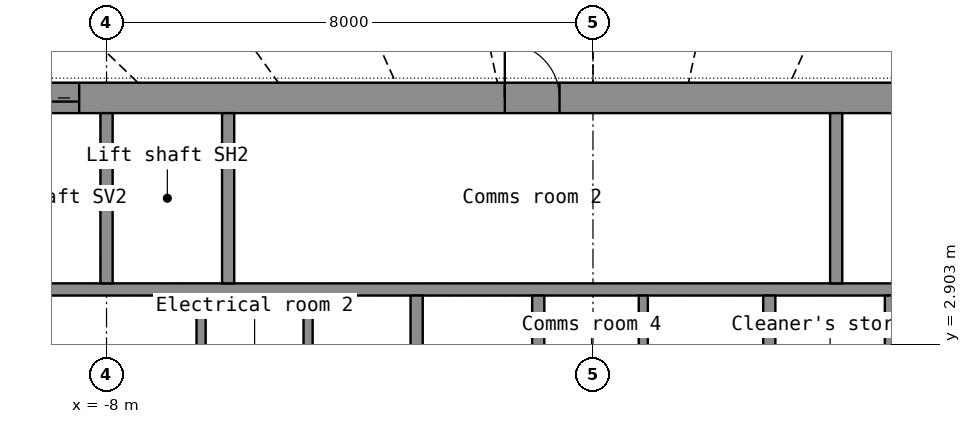
"""IFC4 building model, lengths in metres.
Left out: names, types, materials, properties, quantities, classifications, styles, units other than length and angle.
Written with IfcOpenShell. Run it as: python <this file> out.ifc"""

import sys

from ifc_helpers import new_model, si_unit, direction, frame, frame_2d, origin, place, context, subcontext, project, spatial, rectangle, extrude, element, fill, save


model = new_model("IFC4")
c1 = context("Model", 3, precision=1e-05, world=origin(), true_north=direction((0.0, 1.0)))
c2 = subcontext(c1, "Body", "Model", "MODEL_VIEW")
j1 = project(units=[si_unit("LENGTHUNIT", "METRE"), si_unit("PLANEANGLEUNIT", "RADIAN")], contexts=[c1])
p1 = place(None, origin())
s1 = spatial("IfcSite", under=j1, at=p1, CompositionType="ELEMENT")
p2 = place(p1, origin())
s2 = spatial("IfcBuilding", under=s1, at=p2, CompositionType="ELEMENT")
p3 = place(p2, frame((0.0, 0.0, 130.4)))
s3 = spatial("IfcBuildingStorey", under=s2, at=p3, CompositionType="ELEMENT", Elevation=130.4)
p4 = place(p3, frame((-11.5, 6.95, 0.0), z_axis=(0.0, 0.0, 1.0), x_axis=(1.0, 0.0, 0.0)))
e1 = element("IfcWall", 1, at=p4, inside=s3, PredefinedType="SHEAR", context=c2, shape_type="SweptSolid", body=[
    extrude(rectangle(XDim=23.0, YDim=0.5, at=frame_2d((11.5, 0.0))), origin(), (0.0, 0.0, 1.0), 3.3),
])
p5 = place(p4, frame((1.95, 0.0, 0.0)))
e2 = element("IfcOpeningElement", 2, at=p5, cuts=e1, PredefinedType="OPENING", context=c2, shape_type="SweptSolid", body=[
    extrude(rectangle(XDim=1.1, YDim=2.2, at=frame_2d((0.55, 1.1))), frame((0.0, 0.26, 0.0), z_axis=(0.0, -1.0, 0.0), x_axis=(1.0, 0.0, 0.0)), (0.0, 0.0, 1.0), 0.52),
])
p6 = place(p4, frame((10.05, 0.0, 0.0)))
e3 = element("IfcOpeningElement", 3, at=p6, cuts=e1, PredefinedType="OPENING", context=c2, shape_type="SweptSolid", body=[
    extrude(rectangle(XDim=0.9, YDim=2.1, at=frame_2d((0.45, 1.05))), frame((0.0, 0.26, 0.0), z_axis=(0.0, -1.0, 0.0), x_axis=(1.0, 0.0, 0.0)), (0.0, 0.0, 1.0), 0.52),
])
p7 = place(p4, frame((18.05, 0.0, 0.0)))
e4 = element("IfcOpeningElement", 4, at=p7, cuts=e1, PredefinedType="OPENING", context=c2, shape_type="SweptSolid", body=[
    extrude(rectangle(XDim=0.9, YDim=2.1, at=frame_2d((0.45, 1.05))), frame((0.0, 0.26, 0.0), z_axis=(0.0, -1.0, 0.0), x_axis=(1.0, 0.0, 0.0)), (0.0, 0.0, 1.0), 0.52),
])
p8 = place(p4, frame((0.3, 0.0, 0.0)))
e5 = element("IfcOpeningElement", 5, at=p8, cuts=e1, PredefinedType="OPENING", context=c2, shape_type="SweptSolid", body=[
    extrude(rectangle(XDim=0.8, YDim=2.05, at=frame_2d((0.4, 1.025))), frame((0.0, 0.26, 0.0), z_axis=(0.0, -1.0, 0.0), x_axis=(1.0, 0.0, 0.0)), (0.0, 0.0, 1.0), 0.52),
])
p9 = place(p4, frame((21.9, 0.0, 0.0)))
e6 = element("IfcOpeningElement", 6, at=p9, cuts=e1, PredefinedType="OPENING", context=c2, shape_type="SweptSolid", body=[
    extrude(rectangle(XDim=0.8, YDim=2.05, at=frame_2d((0.4, 1.025))), frame((0.0, 0.26, 0.0), z_axis=(0.0, -1.0, 0.0), x_axis=(1.0, 0.0, 0.0)), (0.0, 0.0, 1.0), 0.52),
])
p10 = place(p3, frame((-11.5, 3.8, 0.0), z_axis=(0.0, 0.0, 1.0), x_axis=(1.0, 0.0, 0.0)))
e7 = element("IfcWall", 7, at=p10, inside=s3, PredefinedType="SHEAR", context=c2, shape_type="SweptSolid", body=[
    extrude(rectangle(XDim=23.0, YDim=0.2, at=frame_2d((11.5, 0.0))), origin(), (0.0, 0.0, 1.0), 3.3),
])
for number, where, z_axis, x_axis in (
    (8, (-8.0, 3.9, 0.0), (0.0, 0.0, 1.0), (0.0, 1.0, 0.0)),
    (9, (-6.0, 3.9, 0.0), (0.0, 0.0, 1.0), (0.0, 1.0, 0.0)),
):
    element("IfcWall", number, at=place(p3, frame(where, z_axis=z_axis, x_axis=x_axis)), inside=s3, PredefinedType="SHEAR", context=c2, shape_type="SweptSolid", body=[
        extrude(rectangle(XDim=2.8, YDim=0.2, at=frame_2d((1.4, 0.0))), origin(), (0.0, 0.0, 1.0), 3.3),
    ])
p11 = place(p3, frame((4.0, 3.9, 0.0), z_axis=(0.0, 0.0, 1.0), x_axis=(0.0, 1.0, 0.0)))
e10 = element("IfcWall", 10, at=p11, inside=s3, PredefinedType="PARTITIONING", context=c2, shape_type="SweptSolid", body=[
    extrude(rectangle(XDim=2.8, YDim=0.2, at=frame_2d((1.4, 0.0))), origin(), (0.0, 0.0, 1.0), 3.3),
])
p12 = place(p3, frame((-2.9, -3.7, 0.0), z_axis=(0.0, 0.0, 1.0), x_axis=(0.0, 1.0, 0.0)))
e11 = element("IfcWall", 11, at=p12, inside=s3, PredefinedType="SHEAR", context=c2, shape_type="SweptSolid", body=[
    extrude(rectangle(XDim=7.4, YDim=0.2, at=frame_2d((3.7, 0.0))), origin(), (0.0, 0.0, 1.0), 3.3),
])
p13 = place(p12, frame((3.1, 0.0, 0.0)))
e12 = element("IfcOpeningElement", 12, at=p13, cuts=e11, PredefinedType="OPENING", context=c2, shape_type="SweptSolid", body=[
    extrude(rectangle(XDim=1.2, YDim=2.2, at=frame_2d((0.6, 1.1))), frame((0.0, 0.11, 0.0), z_axis=(0.0, -1.0, 0.0), x_axis=(1.0, 0.0, 0.0)), (0.0, 0.0, 1.0), 0.22),
])
p14 = place(p3, frame((2.9, -3.7, 0.0), z_axis=(0.0, 0.0, 1.0), x_axis=(0.0, 1.0, 0.0)))
e13 = element("IfcWall", 13, at=p14, inside=s3, PredefinedType="SHEAR", context=c2, shape_type="SweptSolid", body=[
    extrude(rectangle(XDim=7.4, YDim=0.2, at=frame_2d((3.7, 0.0))), origin(), (0.0, 0.0, 1.0), 3.3),
])
p15 = place(p14, frame((3.1, 0.0, 0.0)))
e14 = element("IfcOpeningElement", 14, at=p15, cuts=e13, PredefinedType="OPENING", context=c2, shape_type="SweptSolid", body=[
    extrude(rectangle(XDim=1.2, YDim=2.2, at=frame_2d((0.6, 1.1))), frame((0.0, 0.11, 0.0), z_axis=(0.0, -1.0, 0.0), x_axis=(1.0, 0.0, 0.0)), (0.0, 0.0, 1.0), 0.22),
])
for number, where, z_axis, x_axis in (
    (15, (-0.9, 1.35, 0.0), (0.0, 0.0, 1.0), (0.0, 1.0, 0.0)),
    (16, (4.9, 1.35, 0.0), (0.0, 0.0, 1.0), (0.0, 1.0, 0.0)),
):
    element("IfcWall", number, at=place(p3, frame(where, z_axis=z_axis, x_axis=x_axis)), inside=s3, PredefinedType="SHEAR", context=c2, shape_type="SweptSolid", body=[
        extrude(rectangle(XDim=2.35, YDim=0.2, at=frame_2d((1.175, 0.0))), origin(), (0.0, 0.0, 1.0), 3.3),
    ])
for number, where, z_axis, x_axis in (
    (17, (-6.445, 1.35, 0.0), (0.0, 0.0, 1.0), (0.0, 1.0, 0.0)),
    (18, (-4.685, 1.35, 0.0), (0.0, 0.0, 1.0), (0.0, 1.0, 0.0)),
    (19, (0.827, 1.35, 0.0), (0.0, 0.0, 1.0), (0.0, 1.0, 0.0)),
):
    element("IfcWall", number, at=place(p3, frame(where, z_axis=z_axis, x_axis=x_axis)), inside=s3, PredefinedType="PARTITIONING", context=c2, shape_type="SweptSolid", body=[
        extrude(rectangle(XDim=2.35, YDim=0.15, at=frame_2d((1.175, 0.0))), origin(), (0.0, 0.0, 1.0), 3.3),
    ])
p16 = place(p5, origin())
e20 = element("IfcDoor", 20, at=p16, inside=s3, OperationType="DOUBLE_DOOR_SLIDING", PredefinedType="DOOR", context=c2, shape_type="SweptSolid", body=[
    extrude(rectangle(XDim=1.1, YDim=2.2, at=frame_2d((0.55, 1.1))), frame((0.0, 0.025, 0.0), z_axis=(0.0, -1.0, 0.0), x_axis=(1.0, 0.0, 0.0)), (0.0, 0.0, 1.0), 0.05),
])
fill(e2, e20)
p17 = place(p6, origin())
e21 = element("IfcDoor", 21, at=p17, inside=s3, OperationType="SINGLE_SWING_LEFT", PredefinedType="DOOR", context=c2, shape_type="SweptSolid", body=[
    extrude(rectangle(XDim=0.9, YDim=2.1, at=frame_2d((0.45, 1.05))), frame((0.0, 0.025, 0.0), z_axis=(0.0, -1.0, 0.0), x_axis=(1.0, 0.0, 0.0)), (0.0, 0.0, 1.0), 0.05),
])
fill(e3, e21)
save(model, sys.argv[1])
